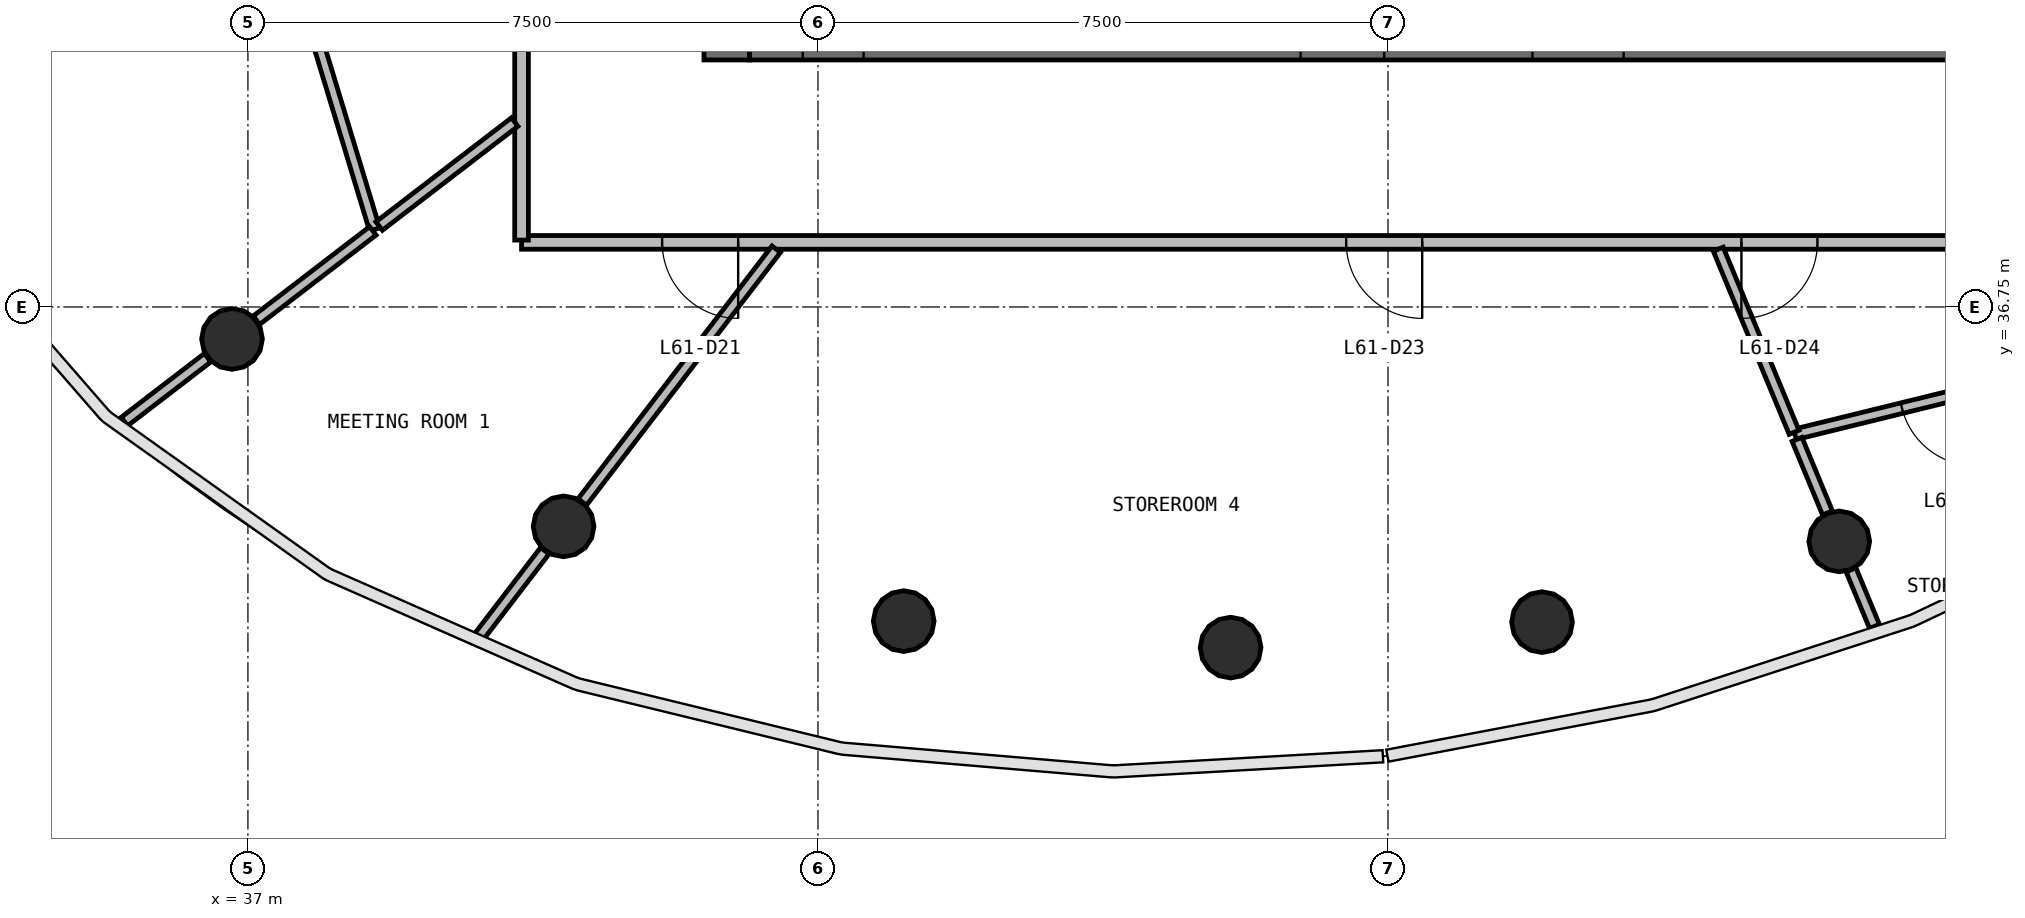
"""IFC4 building model, lengths in metres.
Left out: names, types, materials, properties, quantities, classifications, styles, units other than length and angle.
Written with IfcOpenShell. Run it as: python <this file> out.ifc"""

import sys

from ifc_helpers import new_model, si_unit, direction, frame, frame_2d, origin, origin_2d, place, context, subcontext, project, spatial, rectangle, circle, extrude, source, transform, mapped, element, fill, save


model = new_model("IFC4")
c1 = context("Model", 3, precision=1e-05, world=origin(), true_north=direction((0.0, 1.0)))
c2 = subcontext(c1, "Body", "Model", "MODEL_VIEW")
j1 = project(units=[si_unit("LENGTHUNIT", "METRE"), si_unit("PLANEANGLEUNIT", "RADIAN")], contexts=[c1])
p1 = place(None, origin())
s1 = spatial("IfcSite", under=j1, at=p1, CompositionType="ELEMENT")
p2 = place(p1, origin())
s2 = spatial("IfcBuilding", under=s1, at=p2, CompositionType="ELEMENT")
p3 = place(p2, frame((0.0, 0.0, 250.1)))
s3 = spatial("IfcBuildingStorey", under=s2, at=p3, CompositionType="ELEMENT", Elevation=250.1)
p4 = place(p3, frame((43.3, 56.0, 0.0), z_axis=(0.0, 0.0, 1.0), x_axis=(0.0, -1.0, 0.0)))
e1 = element("IfcWall", 1, at=p4, inside=s3, PredefinedType="SHEAR", context=c2, shape_type="SweptSolid", body=[
    extrude(rectangle(XDim=16.0, YDim=0.6, at=frame_2d((8.0, 0.0))), origin(), (0.0, 0.0, 1.0), 3.9),
])
p5 = place(p4, frame((7.1, 0.0, 0.0)))
e2 = element("IfcOpeningElement", 2, at=p5, cuts=e1, PredefinedType="OPENING", context=c2, shape_type="SweptSolid", body=[
    extrude(rectangle(XDim=1.8, YDim=2.1, at=frame_2d((0.9, 1.05))), frame((0.0, 0.31, 0.0), z_axis=(0.0, -1.0, 0.0), x_axis=(1.0, 0.0, 0.0)), (0.0, 0.0, 1.0), 0.62),
])
p6 = place(p3, frame((43.6, 40.3, 0.0), z_axis=(0.0, 0.0, 1.0), x_axis=(1.0, 0.0, 0.0)))
e3 = element("IfcWall", 3, at=p6, inside=s3, PredefinedType="SHEAR", context=c2, shape_type="SweptSolid", body=[
    extrude(rectangle(XDim=16.8, YDim=0.6, at=frame_2d((8.4, 0.0))), origin(), (0.0, 0.0, 1.0), 3.9),
])
p7 = place(p6, frame((10.3, 0.0, 0.0)))
e4 = element("IfcOpeningElement", 4, at=p7, cuts=e3, PredefinedType="OPENING", context=c2, shape_type="SweptSolid", body=[
    extrude(rectangle(XDim=1.2, YDim=2.1, at=frame_2d((0.6, 1.05))), frame((0.0, 0.31, 0.0), z_axis=(0.0, -1.0, 0.0), x_axis=(1.0, 0.0, 0.0)), (0.0, 0.0, 1.0), 0.62),
])
p8 = place(p6, frame((7.25, 0.0, 0.0)))
e5 = element("IfcOpeningElement", 5, at=p8, cuts=e3, PredefinedType="OPENING", context=c2, shape_type="SweptSolid", body=[
    extrude(rectangle(XDim=1.1, YDim=2.1, at=frame_2d((0.55, 1.05))), frame((0.0, 0.31, 0.0), z_axis=(0.0, -1.0, 0.0), x_axis=(1.0, 0.0, 0.0)), (0.0, 0.0, 1.0), 0.62),
])
p9 = place(p6, frame((0.7, 0.0, 0.0)))
e6 = element("IfcOpeningElement", 6, at=p9, cuts=e3, PredefinedType="OPENING", context=c2, shape_type="SweptSolid", body=[
    extrude(rectangle(XDim=0.8, YDim=2.1, at=frame_2d((0.4, 1.05))), frame((0.0, 0.31, 0.0), z_axis=(0.0, -1.0, 0.0), x_axis=(1.0, 0.0, 0.0)), (0.0, 0.0, 1.0), 0.62),
])
m1 = source(origin(), c2, "Body", "SweptSolid", [
    extrude(circle(Radius=0.4, at=origin_2d()), origin(), (0.0, 0.0, 1.0), 3.9),
])
for number, where, z_axis, x_axis in (
    (7, (36.791, 36.329, 0.0), (0.0, 0.0, 1.0), (1.0, 0.0, 0.0)),
    (8, (41.153, 33.864, 0.0), (0.0, 0.0, 1.0), (1.0, 0.0, 0.0)),
    (9, (45.628, 32.617, 0.0), (0.0, 0.0, 1.0), (1.0, 0.0, 0.0)),
    (10, (49.929, 32.269, 0.0), (0.0, 0.0, 1.0), (1.0, 0.0, 0.0)),
    (11, (54.027, 32.604, 0.0), (0.0, 0.0, 1.0), (1.0, 0.0, 0.0)),
    (12, (57.937, 33.666, 0.0), (0.0, 0.0, 1.0), (1.0, 0.0, 0.0)),
):
    element("IfcColumn", number, at=place(p3, frame(where, z_axis=z_axis, x_axis=x_axis)), inside=s3, PredefinedType="COLUMN", context=c2, shape_type="MappedRepresentation", body=[
        mapped(m1, transform((0.0, 0.0, 0.0), scale=1.0)),
    ])
p10 = place(p3, frame((63.4, 37.6, 0.0), z_axis=(0.0, 0.0, 1.0), x_axis=(-1.0, 0.0, 0.0)))
e13 = element("IfcWall", 13, at=p10, inside=s3, PredefinedType="PARTITIONING", context=c2, shape_type="SweptSolid", body=[
    extrude(rectangle(XDim=22.8, YDim=0.18, at=frame_2d((11.4, 0.0))), origin(), (0.0, 0.0, 1.0), 2.88),
])
p11 = place(p10, frame((19.95, 0.0, 0.0)))
e14 = element("IfcOpeningElement", 14, at=p11, cuts=e13, PredefinedType="OPENING", context=c2, shape_type="SweptSolid", body=[
    extrude(rectangle(XDim=1.0, YDim=2.1, at=frame_2d((0.5, 1.05))), frame((0.0, 0.1, 0.0), z_axis=(0.0, -1.0, 0.0), x_axis=(1.0, 0.0, 0.0)), (0.0, 0.0, 1.0), 0.2),
])
p12 = place(p10, frame((10.95, 0.0, 0.0)))
e15 = element("IfcOpeningElement", 15, at=p12, cuts=e13, PredefinedType="OPENING", context=c2, shape_type="SweptSolid", body=[
    extrude(rectangle(XDim=1.0, YDim=2.1, at=frame_2d((0.5, 1.05))), frame((0.0, 0.1, 0.0), z_axis=(0.0, -1.0, 0.0), x_axis=(1.0, 0.0, 0.0)), (0.0, 0.0, 1.0), 0.2),
])
p13 = place(p10, frame((5.75, 0.0, 0.0)))
e16 = element("IfcOpeningElement", 16, at=p13, cuts=e13, PredefinedType="OPENING", context=c2, shape_type="SweptSolid", body=[
    extrude(rectangle(XDim=1.0, YDim=2.1, at=frame_2d((0.5, 1.05))), frame((0.0, 0.1, 0.0), z_axis=(0.0, -1.0, 0.0), x_axis=(1.0, 0.0, 0.0)), (0.0, 0.0, 1.0), 0.2),
])
p14 = place(p3, frame((40.6, 37.63, 0.0), z_axis=(0.0, 0.0, 1.0), x_axis=(0.0, 1.0, 0.0)))
e17 = element("IfcWall", 17, at=p14, inside=s3, PredefinedType="PARTITIONING", context=c2, shape_type="SweptSolid", body=[
    extrude(rectangle(XDim=20.74, YDim=0.18, at=frame_2d((10.37, 0.0))), origin(), (0.0, 0.0, 1.0), 2.88),
])
p15 = place(p14, frame((7.79, 0.0, 0.0)))
e18 = element("IfcOpeningElement", 18, at=p15, cuts=e17, PredefinedType="OPENING", context=c2, shape_type="SweptSolid", body=[
    extrude(rectangle(XDim=0.9, YDim=2.1, at=frame_2d((0.45, 1.05))), frame((0.0, 0.1, 0.0), z_axis=(0.0, -1.0, 0.0), x_axis=(1.0, 0.0, 0.0)), (0.0, 0.0, 1.0), 0.2),
])
p16 = place(p14, frame((4.39, 0.0, 0.0)))
e19 = element("IfcOpeningElement", 19, at=p16, cuts=e17, PredefinedType="OPENING", context=c2, shape_type="SweptSolid", body=[
    extrude(rectangle(XDim=0.9, YDim=2.1, at=frame_2d((0.45, 1.05))), frame((0.0, 0.1, 0.0), z_axis=(0.0, -1.0, 0.0), x_axis=(1.0, 0.0, 0.0)), (0.0, 0.0, 1.0), 0.2),
])
p17 = place(p14, frame((15.49, 0.0, 0.0)))
e20 = element("IfcOpeningElement", 20, at=p17, cuts=e17, PredefinedType="OPENING", context=c2, shape_type="SweptSolid", body=[
    extrude(rectangle(XDim=1.0, YDim=2.1, at=frame_2d((0.5, 1.05))), frame((0.0, 0.1, 0.0), z_axis=(0.0, -1.0, 0.0), x_axis=(1.0, 0.0, 0.0)), (0.0, 0.0, 1.0), 0.2),
])
p18 = place(p14, frame((9.89, 0.0, 0.0)))
e21 = element("IfcOpeningElement", 21, at=p18, cuts=e17, PredefinedType="OPENING", context=c2, shape_type="SweptSolid", body=[
    extrude(rectangle(XDim=1.0, YDim=2.1, at=frame_2d((0.5, 1.05))), frame((0.0, 0.1, 0.0), z_axis=(0.0, -1.0, 0.0), x_axis=(1.0, 0.0, 0.0)), (0.0, 0.0, 1.0), 0.2),
])
p19 = place(p3, frame((37.4, 41.952, 0.0), z_axis=(0.0, 0.0, 1.0), x_axis=(0.290001194342, -0.957026283485, 0.0)))
e22 = element("IfcWall", 22, at=p19, inside=s3, PredefinedType="PARTITIONING", context=c2, shape_type="SweptSolid", body=[
    extrude(rectangle(XDim=4.371, YDim=0.14, at=frame_2d((2.186, 0.0))), origin(), (0.0, 0.0, 1.0), 2.88),
])
p20 = place(p3, frame((43.951, 37.51, 0.0), z_axis=(0.0, 0.0, 1.0), x_axis=(-0.60875313342, -0.793359705651, 0.0)))
e23 = element("IfcWall", 23, at=p20, inside=s3, PredefinedType="PARTITIONING", context=c2, shape_type="SweptSolid", body=[
    extrude(rectangle(XDim=4.191, YDim=0.14, at=frame_2d((2.095, 0.0))), origin(), (0.0, 0.0, 1.0), 2.88),
])
p21 = place(p3, frame((61.156, 36.008, 0.0), z_axis=(0.0, 0.0, 1.0), x_axis=(-0.97111056308, -0.238629994499, 0.0)))
e24 = element("IfcWall", 24, at=p21, inside=s3, PredefinedType="PARTITIONING", context=c2, shape_type="SweptSolid", body=[
    extrude(rectangle(XDim=3.914, YDim=0.14, at=frame_2d((1.957, 0.0))), origin(), (0.0, 0.0, 1.0), 2.88),
])
p22 = place(p21, frame((1.465, 0.0, 0.0)))
e25 = element("IfcOpeningElement", 25, at=p22, cuts=e24, PredefinedType="OPENING", context=c2, shape_type="SweptSolid", body=[
    extrude(rectangle(XDim=1.0, YDim=2.1, at=frame_2d((0.5, 1.05))), frame((0.0, 0.08, 0.0), z_axis=(0.0, -1.0, 0.0), x_axis=(1.0, 0.0, 0.0)), (0.0, 0.0, 1.0), 0.16),
])
p23 = place(p3, frame((56.345, 37.51, 0.0), z_axis=(0.0, 0.0, 1.0), x_axis=(0.382666102352, -0.923886710647, 0.0)))
e26 = element("IfcWall", 26, at=p23, inside=s3, PredefinedType="PARTITIONING", context=c2, shape_type="SweptSolid", body=[
    extrude(rectangle(XDim=2.607, YDim=0.14, at=frame_2d((1.303, 0.0))), origin(), (0.0, 0.0, 1.0), 2.88),
])
p24 = place(p3, frame((40.51, 39.183, 0.0), z_axis=(0.0, 0.0, 1.0), x_axis=(-0.793370316216, -0.608739304914, 0.0)))
e27 = element("IfcWall", 27, at=p24, inside=s3, PredefinedType="PARTITIONING", context=c2, shape_type="SweptSolid", body=[
    extrude(rectangle(XDim=2.248, YDim=0.14, at=frame_2d((1.124, 0.0))), origin(), (0.0, 0.0, 1.0), 2.88),
])
p25 = place(p3, frame((38.644, 37.751, 0.0), z_axis=(0.0, 0.0, 1.0), x_axis=(-0.793351926694, -0.60876327124, 0.0)))
e28 = element("IfcWall", 28, at=p25, inside=s3, PredefinedType="PARTITIONING", context=c2, shape_type="SweptSolid", body=[
    extrude(rectangle(XDim=1.931, YDim=0.14, at=frame_2d((0.965, 0.0))), origin(), (0.0, 0.0, 1.0), 2.88),
])
p26 = place(p3, frame((40.907, 33.543, 0.0), z_axis=(0.0, 0.0, 1.0), x_axis=(-0.608682974902, -0.793413534082, 0.0)))
e29 = element("IfcWall", 29, at=p26, inside=s3, PredefinedType="PARTITIONING", context=c2, shape_type="SweptSolid", body=[
    extrude(rectangle(XDim=1.447, YDim=0.14, at=frame_2d((0.724, 0.0))), origin(), (0.0, 0.0, 1.0), 2.88),
])
p27 = place(p3, frame((36.469, 36.083, 0.0), z_axis=(0.0, 0.0, 1.0), x_axis=(-0.793347091369, -0.608769572676, 0.0)))
e30 = element("IfcWall", 30, at=p27, inside=s3, PredefinedType="PARTITIONING", context=c2, shape_type="SweptSolid", body=[
    extrude(rectangle(XDim=1.38, YDim=0.14, at=frame_2d((0.69, 0.0))), origin(), (0.0, 0.0, 1.0), 2.88),
])
p28 = place(p3, frame((57.381, 35.008, 0.0), z_axis=(0.0, 0.0, 1.0), x_axis=(0.382612471688, -0.923908922194, 0.0)))
e31 = element("IfcWall", 31, at=p28, inside=s3, PredefinedType="PARTITIONING", context=c2, shape_type="SweptSolid", body=[
    extrude(rectangle(XDim=1.048, YDim=0.14, at=frame_2d((0.524, 0.0))), origin(), (0.0, 0.0, 1.0), 2.88),
])
p29 = place(p3, frame((58.092, 33.292, 0.0), z_axis=(0.0, 0.0, 1.0), x_axis=(0.382548125173, -0.923935566978, 0.0)))
e32 = element("IfcWall", 32, at=p29, inside=s3, PredefinedType="PARTITIONING", context=c2, shape_type="SweptSolid", body=[
    extrude(rectangle(XDim=0.805, YDim=0.14, at=frame_2d((0.403, 0.0))), origin(), (0.0, 0.0, 1.0), 2.88),
])
m2 = source(origin(), c2, "Body", "SweptSolid", [
    extrude(rectangle(XDim=1.0, YDim=2.1, at=frame_2d((0.5, 1.05))), frame((0.0, 0.025, 0.0), z_axis=(0.0, -1.0, 0.0), x_axis=(1.0, 0.0, 0.0)), (0.0, 0.0, 1.0), 0.05),
])
p30 = place(p11, origin())
e33 = element("IfcDoor", 33, at=p30, inside=s3, OperationType="SINGLE_SWING_LEFT", PredefinedType="DOOR", context=c2, shape_type="MappedRepresentation", body=[
    mapped(m2, transform((0.0, 0.0, 0.0), scale=1.0)),
])
fill(e14, e33)
p31 = place(p12, origin())
e34 = element("IfcDoor", 34, at=p31, inside=s3, OperationType="SINGLE_SWING_LEFT", PredefinedType="DOOR", context=c2, shape_type="MappedRepresentation", body=[
    mapped(m2, transform((0.0, 0.0, 0.0), scale=1.0)),
])
fill(e15, e34)
p32 = place(p13, origin())
e35 = element("IfcDoor", 35, at=p32, inside=s3, OperationType="SINGLE_SWING_RIGHT", PredefinedType="DOOR", context=c2, shape_type="MappedRepresentation", body=[
    mapped(m2, transform((0.0, 0.0, 0.0), scale=1.0)),
])
fill(e16, e35)
p33 = place(p22, origin())
e36 = element("IfcDoor", 36, at=p33, inside=s3, OperationType="SINGLE_SWING_LEFT", PredefinedType="DOOR", context=c2, shape_type="MappedRepresentation", body=[
    mapped(m2, transform((0.0, 0.0, 0.0), scale=1.0)),
])
fill(e25, e36)
save(model, sys.argv[1])
